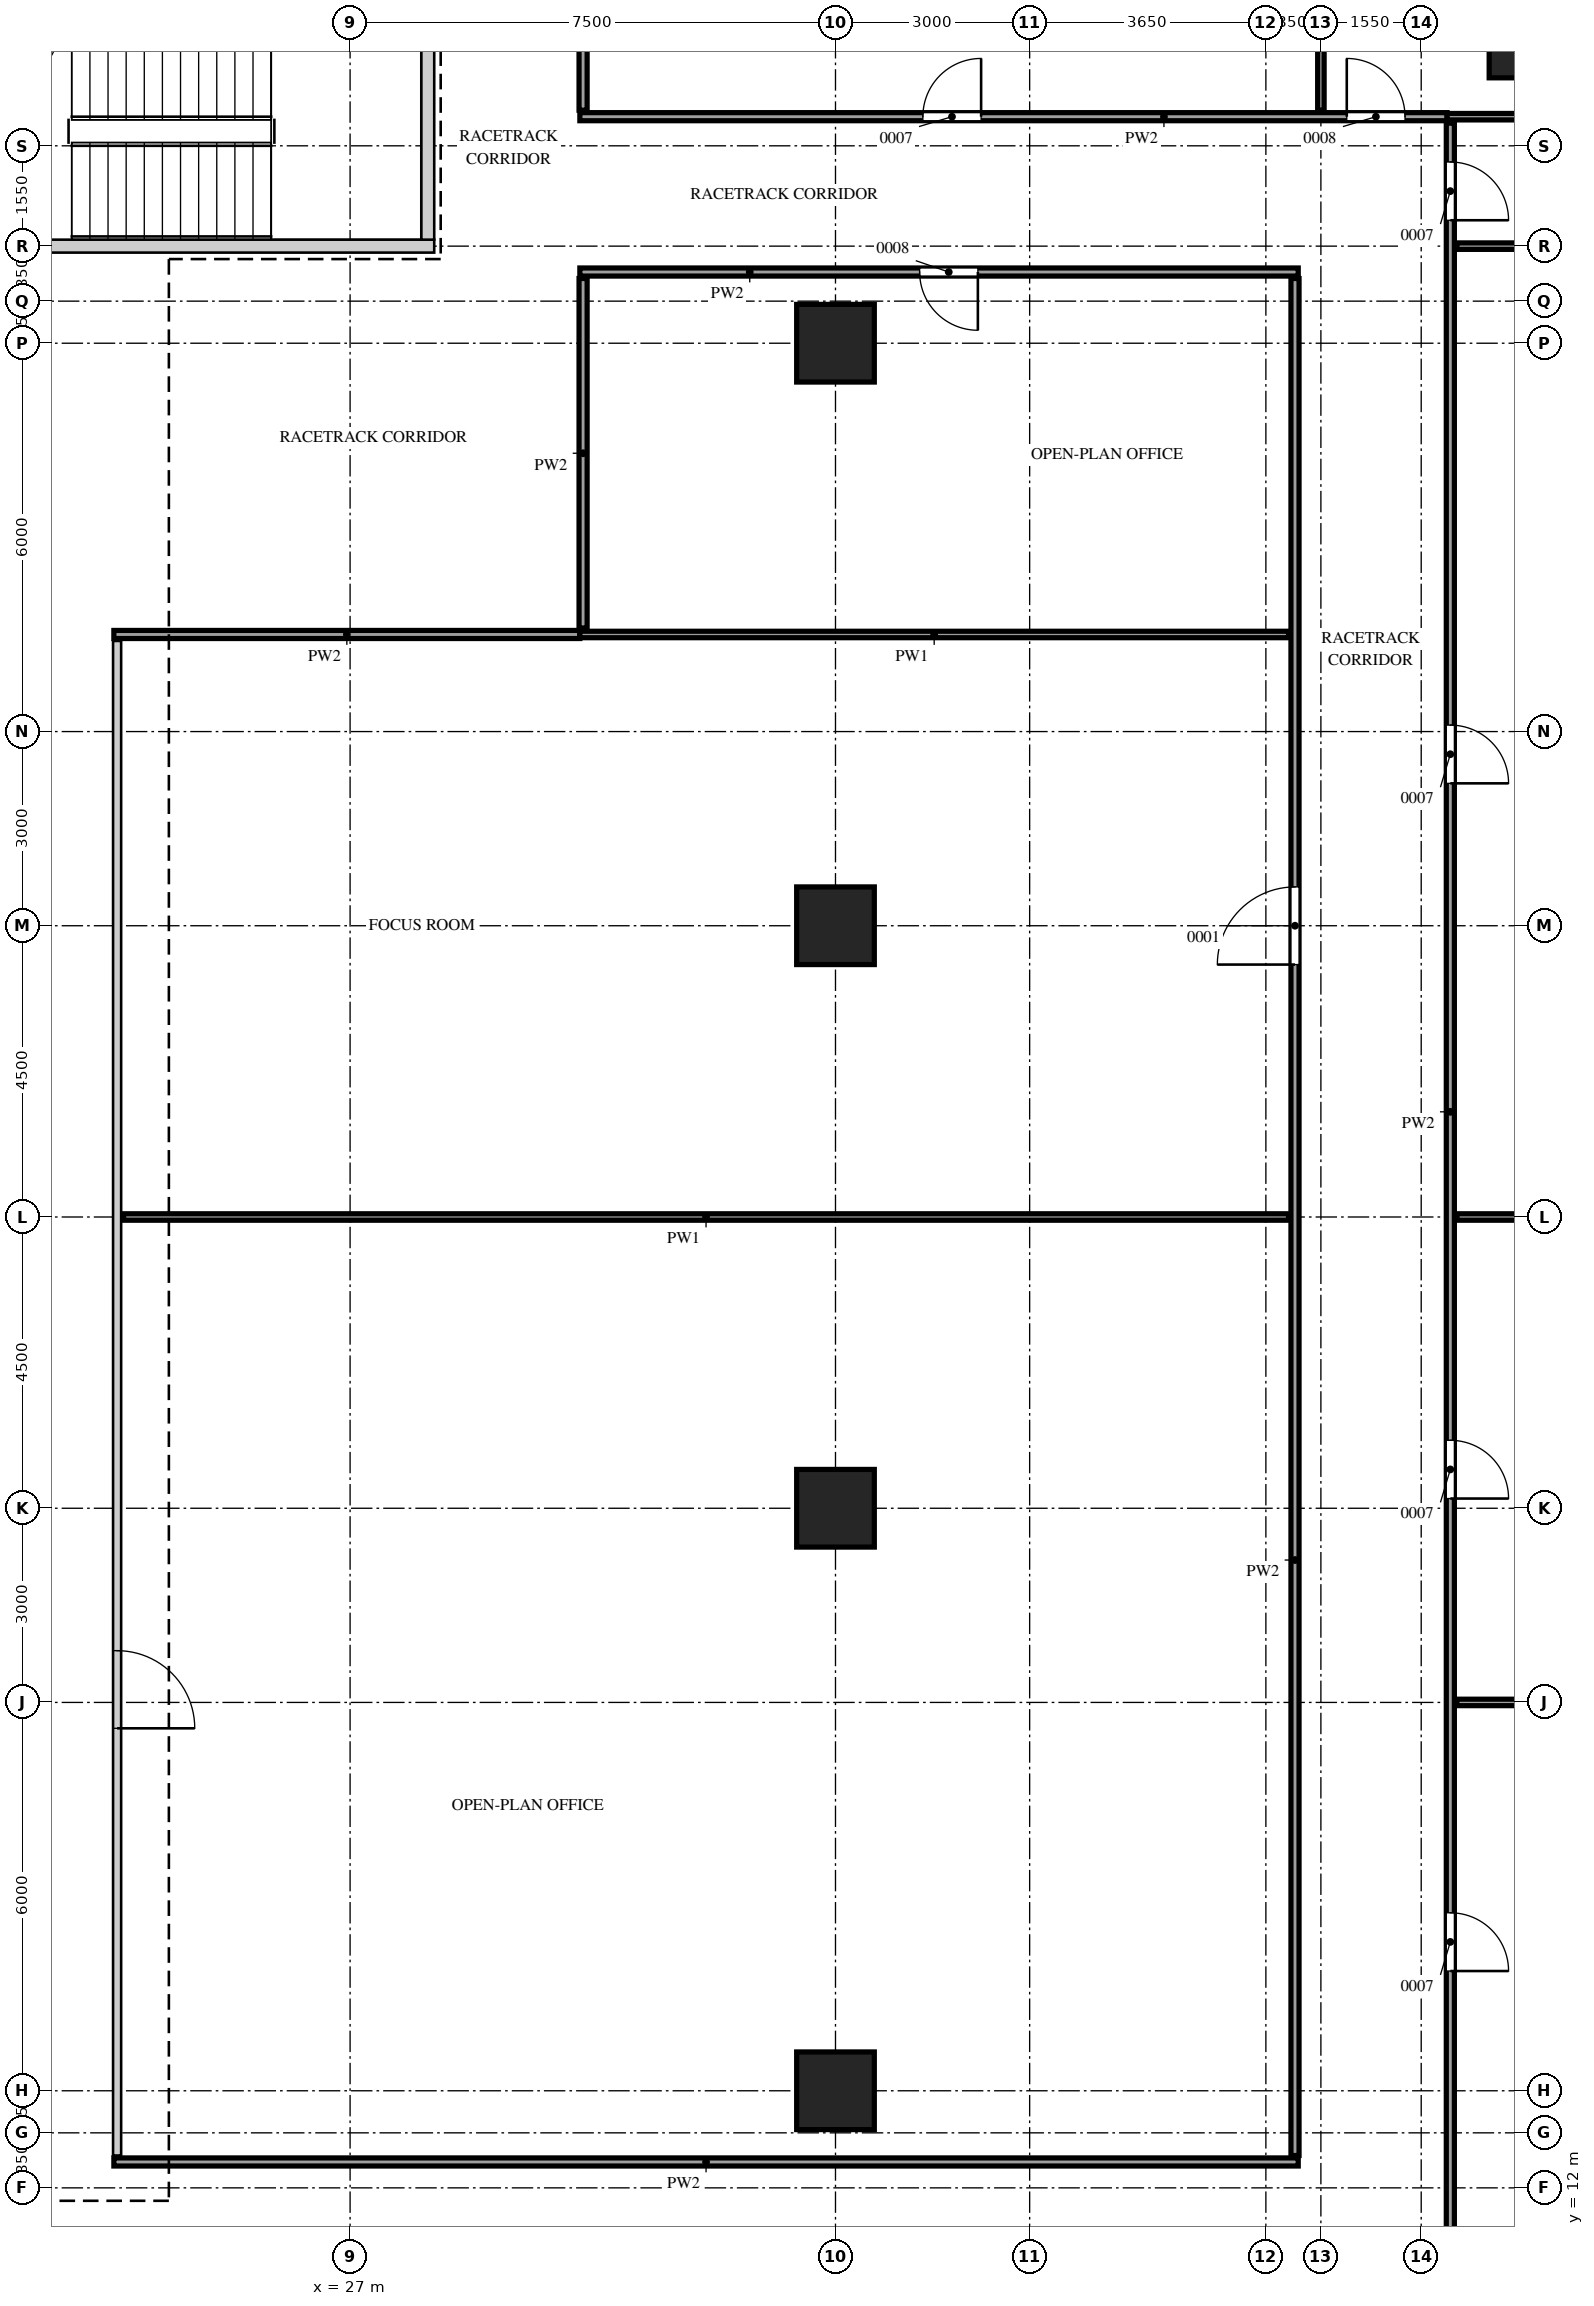
"""IFC4 building model, lengths in metres.
Left out: names, types, materials, properties, quantities, classifications, styles, units other than length and angle.
Written with IfcOpenShell. Run it as: python <this file> out.ifc"""

import sys

from ifc_helpers import new_model, si_unit, direction, frame, frame_2d, origin, origin_2d, place, context, subcontext, project, spatial, rectangle, extrude, source, transform, mapped, element, fill, save


model = new_model("IFC4")
c1 = context("Model", 3, precision=1e-05, world=origin(), true_north=direction((0.0, 1.0)))
c2 = subcontext(c1, "Body", "Model", "MODEL_VIEW")
j1 = project(units=[si_unit("LENGTHUNIT", "METRE"), si_unit("PLANEANGLEUNIT", "RADIAN")], contexts=[c1])
p1 = place(None, origin())
s1 = spatial("IfcSite", under=j1, at=p1, CompositionType="ELEMENT")
p2 = place(p1, origin())
s2 = spatial("IfcBuilding", under=s1, at=p2, CompositionType="ELEMENT")
p3 = place(p2, frame((0.0, 0.0, 192.7)))
s3 = spatial("IfcBuildingStorey", under=s2, at=p3, CompositionType="ELEMENT", Elevation=192.7)
m1 = source(origin(), c2, "Body", "SweptSolid", [
    extrude(rectangle(XDim=7.1, YDim=0.2, at=frame_2d((3.55, 0.0))), origin(), (0.0, 0.0, 1.0), 3.75),
])
p4 = place(p3, frame((21.2, 42.0, 0.0), z_axis=(0.0, 0.0, 1.0), x_axis=(1.0, 0.0, 0.0)))
e1 = element("IfcWall", 1, at=p4, inside=s3, PredefinedType="SHEAR", context=c2, shape_type="MappedRepresentation", body=[
    mapped(m1, transform((0.0, 0.0, 0.0))),
])
m2 = source(origin(), c2, "Body", "SweptSolid", [
    extrude(rectangle(XDim=3.35, YDim=0.2, at=frame_2d((1.675, 0.0))), origin(), (0.0, 0.0, 1.0), 3.75),
])
p5 = place(p3, frame((28.2, 42.1, 0.0), z_axis=(0.0, 0.0, 1.0), x_axis=(0.0, 1.0, 0.0)))
e2 = element("IfcWall", 2, at=p5, inside=s3, PredefinedType="SHEAR", context=c2, shape_type="MappedRepresentation", body=[
    mapped(m2, transform((0.0, 0.0, 0.0))),
])
m3 = source(origin(), c2, "Body", "SweptSolid", [
    extrude(rectangle(XDim=1.9, YDim=1.9, at=origin_2d()), origin(), (0.0, 0.0, 1.0), 4.0),
])
p6 = place(p3, frame((45.55, 45.55, 0.0), z_axis=(0.0, 0.0, 1.0), x_axis=(1.0, 0.0, 0.0)))
e3 = element("IfcColumn", 3, at=p6, inside=s3, PredefinedType="COLUMN", context=c2, shape_type="MappedRepresentation", body=[
    mapped(m3, transform((0.0, 0.0, 0.0))),
])
m4 = source(origin(), c2, "Body", "SweptSolid", [
    extrude(rectangle(XDim=1.2, YDim=1.2, at=origin_2d()), origin(), (0.0, 0.0, 1.0), 3.75),
])
for number, where, z_axis, x_axis in (
    (4, (34.5, 13.5, 0.0), (0.0, 0.0, 1.0), (1.0, 0.0, 0.0)),
    (5, (34.5, 22.5, 0.0), (0.0, 0.0, 1.0), (1.0, 0.0, 0.0)),
    (6, (34.5, 31.5, 0.0), (0.0, 0.0, 1.0), (1.0, 0.0, 0.0)),
    (7, (34.5, 40.5, 0.0), (0.0, 0.0, 1.0), (1.0, 0.0, 0.0)),
):
    element("IfcColumn", number, at=place(p3, frame(where, z_axis=z_axis, x_axis=x_axis)), inside=s3, PredefinedType="COLUMN", context=c2, shape_type="MappedRepresentation", body=[
        mapped(m4, transform((0.0, 0.0, 0.0))),
    ])
m5 = source(origin(), c2, "Body", "SweptSolid", [
    extrude(rectangle(XDim=33.8, YDim=0.125, at=frame_2d((16.9, 0.0))), origin(), (0.0, 0.0, 1.0), 3.8),
])
p7 = place(p3, frame((44.0, 10.1, 0.0), z_axis=(0.0, 0.0, 1.0), x_axis=(0.0, 1.0, 0.0)))
e8 = element("IfcWall", 8, at=p7, inside=s3, PredefinedType="PARTITIONING", context=c2, shape_type="MappedRepresentation", body=[
    mapped(m5, transform((0.0, 0.0, 0.0))),
])
m6 = source(origin(), c2, "Body", "SweptSolid", [
    extrude(rectangle(XDim=0.9, YDim=2.1, at=frame_2d((0.45, 1.05))), frame((0.0, 0.073, 0.0), z_axis=(0.0, -1.0, 0.0), x_axis=(1.0, 0.0, 0.0)), (0.0, 0.0, 1.0), 0.145),
])
p8 = place(p7, frame((5.25, 0.0, 0.0)))
e9 = element("IfcOpeningElement", 9, at=p8, cuts=e8, PredefinedType="OPENING", context=c2, shape_type="MappedRepresentation", body=[
    mapped(m6, transform((0.0, 0.0, 0.0))),
])
p9 = place(p7, frame((12.55, 0.0, 0.0)))
e10 = element("IfcOpeningElement", 10, at=p9, cuts=e8, PredefinedType="OPENING", context=c2, shape_type="MappedRepresentation", body=[
    mapped(m6, transform((0.0, 0.0, 0.0))),
])
p10 = place(p7, frame((23.6, 0.0, 0.0)))
e11 = element("IfcOpeningElement", 11, at=p10, cuts=e8, PredefinedType="OPENING", context=c2, shape_type="MappedRepresentation", body=[
    mapped(m6, transform((0.0, 0.0, 0.0))),
])
p11 = place(p7, frame((32.3, 0.0, 0.0)))
e12 = element("IfcOpeningElement", 12, at=p11, cuts=e8, PredefinedType="OPENING", context=c2, shape_type="MappedRepresentation", body=[
    mapped(m6, transform((0.0, 0.0, 0.0))),
])
m7 = source(origin(), c2, "Body", "SweptSolid", [
    extrude(rectangle(XDim=18.3, YDim=0.125, at=frame_2d((9.15, 0.0))), origin(), (0.0, 0.0, 1.0), 3.8),
])
p12 = place(p3, frame((23.35, 12.4, 0.0), z_axis=(0.0, 0.0, 1.0), x_axis=(1.0, 0.0, 0.0)))
e13 = element("IfcWall", 13, at=p12, inside=s3, PredefinedType="PARTITIONING", context=c2, shape_type="MappedRepresentation", body=[
    mapped(m7, transform((0.0, 0.0, 0.0))),
])
m8 = source(origin(), c2, "Body", "SweptSolid", [
    extrude(rectangle(XDim=23.4, YDim=0.125, at=frame_2d((11.7, 0.0))), origin(), (0.0, 0.0, 1.0), 3.8),
])
p13 = place(p3, frame((23.4, 12.5, 0.0), z_axis=(0.0, 0.0, 1.0), x_axis=(0.0, 1.0, 0.0)))
e14 = element("IfcWall", 14, at=p13, inside=s3, PredefinedType="PARTITIONING", context=c2, shape_type="MappedRepresentation", body=[
    mapped(m8, transform((0.0, 0.0, 0.0))),
])
m9 = source(origin(), c2, "Body", "SweptSolid", [
    extrude(rectangle(XDim=1.2, YDim=2.1, at=frame_2d((0.6, 1.05))), frame((0.0, 0.073, 0.0), z_axis=(0.0, -1.0, 0.0), x_axis=(1.0, 0.0, 0.0)), (0.0, 0.0, 1.0), 0.145),
])
p14 = place(p13, frame((6.6, 0.0, 0.0)))
e15 = element("IfcOpeningElement", 15, at=p14, cuts=e14, PredefinedType="OPENING", context=c2, shape_type="MappedRepresentation", body=[
    mapped(m9, transform((0.0, 0.0, 0.0))),
])
m10 = source(origin(), c2, "Body", "SweptSolid", [
    extrude(rectangle(XDim=29.0, YDim=0.125, at=frame_2d((14.5, 0.0))), origin(), (0.0, 0.0, 1.0), 3.8),
])
p15 = place(p3, frame((41.6, 12.5, 0.0), z_axis=(0.0, 0.0, 1.0), x_axis=(0.0, 1.0, 0.0)))
e16 = element("IfcWall", 16, at=p15, inside=s3, PredefinedType="PARTITIONING", context=c2, shape_type="MappedRepresentation", body=[
    mapped(m10, transform((0.0, 0.0, 0.0))),
])
p16 = place(p15, frame((18.4, 0.0, 0.0)))
e17 = element("IfcOpeningElement", 17, at=p16, cuts=e16, PredefinedType="OPENING", context=c2, shape_type="MappedRepresentation", body=[
    mapped(m9, transform((0.0, 0.0, 0.0))),
])
m11 = source(origin(), c2, "Body", "SweptSolid", [
    extrude(rectangle(XDim=6.75, YDim=0.1, at=frame_2d((3.375, 0.0))), origin(), (0.0, 0.0, 1.0), 3.8),
])
p17 = place(p3, frame((44.1, 19.5, 0.0), z_axis=(0.0, 0.0, 1.0), x_axis=(1.0, 0.0, 0.0)))
e18 = element("IfcWall", 18, at=p17, inside=s3, PredefinedType="PARTITIONING", context=c2, shape_type="MappedRepresentation", body=[
    mapped(m11, transform((0.0, 0.0, 0.0))),
])
m12 = source(origin(), c2, "Body", "SweptSolid", [
    extrude(rectangle(XDim=18.0, YDim=0.1, at=frame_2d((9.0, 0.0))), origin(), (0.0, 0.0, 1.0), 3.8),
])
p18 = place(p3, frame((23.5, 27.0, 0.0), z_axis=(0.0, 0.0, 1.0), x_axis=(1.0, 0.0, 0.0)))
e19 = element("IfcWall", 19, at=p18, inside=s3, PredefinedType="PARTITIONING", context=c2, shape_type="MappedRepresentation", body=[
    mapped(m12, transform((0.0, 0.0, 0.0))),
])
p19 = place(p3, frame((44.1, 27.0, 0.0), z_axis=(0.0, 0.0, 1.0), x_axis=(1.0, 0.0, 0.0)))
e20 = element("IfcWall", 20, at=p19, inside=s3, PredefinedType="PARTITIONING", context=c2, shape_type="MappedRepresentation", body=[
    mapped(m11, transform((0.0, 0.0, 0.0))),
])
m13 = source(origin(), c2, "Body", "SweptSolid", [
    extrude(rectangle(XDim=7.2, YDim=0.125, at=frame_2d((3.6, 0.0))), origin(), (0.0, 0.0, 1.0), 3.8),
])
p20 = place(p3, frame((23.35, 36.0, 0.0), z_axis=(0.0, 0.0, 1.0), x_axis=(1.0, 0.0, 0.0)))
e21 = element("IfcWall", 21, at=p20, inside=s3, PredefinedType="PARTITIONING", context=c2, shape_type="MappedRepresentation", body=[
    mapped(m13, transform((0.0, 0.0, 0.0))),
])
m14 = source(origin(), c2, "Body", "SweptSolid", [
    extrude(rectangle(XDim=10.95, YDim=0.1, at=frame_2d((5.475, 0.0))), origin(), (0.0, 0.0, 1.0), 3.8),
])
p21 = place(p3, frame((30.55, 36.0, 0.0), z_axis=(0.0, 0.0, 1.0), x_axis=(1.0, 0.0, 0.0)))
e22 = element("IfcWall", 22, at=p21, inside=s3, PredefinedType="PARTITIONING", context=c2, shape_type="MappedRepresentation", body=[
    mapped(m14, transform((0.0, 0.0, 0.0))),
])
m15 = source(origin(), c2, "Body", "SweptSolid", [
    extrude(rectangle(XDim=5.4, YDim=0.125, at=frame_2d((2.7, 0.0))), origin(), (0.0, 0.0, 1.0), 3.8),
])
p22 = place(p3, frame((30.6, 36.1, 0.0), z_axis=(0.0, 0.0, 1.0), x_axis=(0.0, 1.0, 0.0)))
e23 = element("IfcWall", 23, at=p22, inside=s3, PredefinedType="PARTITIONING", context=c2, shape_type="MappedRepresentation", body=[
    mapped(m15, transform((0.0, 0.0, 0.0))),
])
m16 = source(origin(), c2, "Body", "SweptSolid", [
    extrude(rectangle(XDim=11.1, YDim=0.125, at=frame_2d((5.55, 0.0))), origin(), (0.0, 0.0, 1.0), 3.8),
])
p23 = place(p3, frame((30.55, 41.6, 0.0), z_axis=(0.0, 0.0, 1.0), x_axis=(1.0, 0.0, 0.0)))
e24 = element("IfcWall", 24, at=p23, inside=s3, PredefinedType="PARTITIONING", context=c2, shape_type="MappedRepresentation", body=[
    mapped(m16, transform((0.0, 0.0, 0.0))),
])
p24 = place(p23, frame((5.25, 0.0, 0.0)))
e25 = element("IfcOpeningElement", 25, at=p24, cuts=e24, PredefinedType="OPENING", context=c2, shape_type="MappedRepresentation", body=[
    mapped(m6, transform((0.0, 0.0, 0.0))),
])
p25 = place(p3, frame((44.1, 42.0, 0.0), z_axis=(0.0, 0.0, 1.0), x_axis=(1.0, 0.0, 0.0)))
e26 = element("IfcWall", 26, at=p25, inside=s3, PredefinedType="PARTITIONING", context=c2, shape_type="MappedRepresentation", body=[
    mapped(m11, transform((0.0, 0.0, 0.0))),
])
m17 = source(origin(), c2, "Body", "SweptSolid", [
    extrude(rectangle(XDim=13.4, YDim=0.125, at=frame_2d((6.7, 0.0))), origin(), (0.0, 0.0, 1.0), 3.8),
])
p26 = place(p3, frame((30.55, 44.0, 0.0), z_axis=(0.0, 0.0, 1.0), x_axis=(1.0, 0.0, 0.0)))
e27 = element("IfcWall", 27, at=p26, inside=s3, PredefinedType="PARTITIONING", context=c2, shape_type="MappedRepresentation", body=[
    mapped(m17, transform((0.0, 0.0, 0.0))),
])
p27 = place(p26, frame((5.3, 0.0, 0.0)))
e28 = element("IfcOpeningElement", 28, at=p27, cuts=e27, PredefinedType="OPENING", context=c2, shape_type="MappedRepresentation", body=[
    mapped(m6, transform((0.0, 0.0, 0.0))),
])
p28 = place(p26, frame((11.85, 0.0, 0.0)))
e29 = element("IfcOpeningElement", 29, at=p28, cuts=e27, PredefinedType="OPENING", context=c2, shape_type="MappedRepresentation", body=[
    mapped(m6, transform((0.0, 0.0, 0.0))),
])
m18 = source(origin(), c2, "Body", "SweptSolid", [
    extrude(rectangle(XDim=6.9, YDim=0.1, at=frame_2d((3.45, 0.0))), origin(), (0.0, 0.0, 1.0), 3.8),
])
p29 = place(p3, frame((43.95, 44.0, 0.0), z_axis=(0.0, 0.0, 1.0), x_axis=(1.0, 0.0, 0.0)))
e30 = element("IfcWall", 30, at=p29, inside=s3, PredefinedType="PARTITIONING", context=c2, shape_type="MappedRepresentation", body=[
    mapped(m18, transform((0.0, 0.0, 0.0))),
])
m19 = source(origin(), c2, "Body", "SweptSolid", [
    extrude(rectangle(XDim=3.85, YDim=0.125, at=frame_2d((1.925, 0.0))), origin(), (0.0, 0.0, 1.0), 3.8),
])
p30 = place(p3, frame((30.6, 44.1, 0.0), z_axis=(0.0, 0.0, 1.0), x_axis=(0.0, 1.0, 0.0)))
e31 = element("IfcWall", 31, at=p30, inside=s3, PredefinedType="PARTITIONING", context=c2, shape_type="MappedRepresentation", body=[
    mapped(m19, transform((0.0, 0.0, 0.0))),
])
m20 = source(origin(), c2, "Body", "SweptSolid", [
    extrude(rectangle(XDim=6.75, YDim=0.1, at=frame_2d((3.375, 0.0))), origin(), (0.0, 0.0, 1.0), 3.3),
])
p31 = place(p3, frame((42.0, 44.1, 0.0), z_axis=(0.0, 0.0, 1.0), x_axis=(0.0, 1.0, 0.0)))
e32 = element("IfcWall", 32, at=p31, inside=s3, PredefinedType="PARTITIONING", context=c2, shape_type="MappedRepresentation", body=[
    mapped(m20, transform((0.0, 0.0, 0.0))),
])
m21 = source(origin(), c2, "Body", "SweptSolid", [
    extrude(rectangle(XDim=0.9, YDim=2.1, at=frame_2d((0.45, 1.05))), frame((0.0, 0.025, 0.0), z_axis=(0.0, -1.0, 0.0), x_axis=(1.0, 0.0, 0.0)), (0.0, 0.0, 1.0), 0.05),
])
p32 = place(p8, origin())
e33 = element("IfcDoor", 33, at=p32, inside=s3, OperationType="SINGLE_SWING_LEFT", PredefinedType="DOOR", context=c2, shape_type="MappedRepresentation", body=[
    mapped(m21, transform((0.0, 0.0, 0.0))),
])
fill(e9, e33)
p33 = place(p9, origin())
e34 = element("IfcDoor", 34, at=p33, inside=s3, OperationType="SINGLE_SWING_LEFT", PredefinedType="DOOR", context=c2, shape_type="MappedRepresentation", body=[
    mapped(m21, transform((0.0, 0.0, 0.0))),
])
fill(e10, e34)
p34 = place(p10, origin())
e35 = element("IfcDoor", 35, at=p34, inside=s3, OperationType="SINGLE_SWING_LEFT", PredefinedType="DOOR", context=c2, shape_type="MappedRepresentation", body=[
    mapped(m21, transform((0.0, 0.0, 0.0))),
])
fill(e11, e35)
p35 = place(p11, origin())
e36 = element("IfcDoor", 36, at=p35, inside=s3, OperationType="SINGLE_SWING_LEFT", PredefinedType="DOOR", context=c2, shape_type="MappedRepresentation", body=[
    mapped(m21, transform((0.0, 0.0, 0.0))),
])
fill(e12, e36)
p36 = place(p27, origin())
e37 = element("IfcDoor", 37, at=p36, inside=s3, OperationType="SINGLE_SWING_LEFT", PredefinedType="DOOR", context=c2, shape_type="MappedRepresentation", body=[
    mapped(m21, transform((0.0, 0.0, 0.0))),
])
fill(e28, e37)
p37 = place(p28, origin())
e38 = element("IfcDoor", 38, at=p37, inside=s3, OperationType="SINGLE_SWING_RIGHT", PredefinedType="DOOR", context=c2, shape_type="MappedRepresentation", body=[
    mapped(m21, transform((0.0, 0.0, 0.0))),
])
fill(e29, e38)
m22 = source(origin(), c2, "Body", "SweptSolid", [
    extrude(rectangle(XDim=1.2, YDim=2.1, at=frame_2d((0.6, 1.05))), frame((0.0, 0.025, 0.0), z_axis=(0.0, -1.0, 0.0), x_axis=(1.0, 0.0, 0.0)), (0.0, 0.0, 1.0), 0.05),
])
p38 = place(p14, origin())
e39 = element("IfcDoor", 39, at=p38, inside=s3, OperationType="SINGLE_SWING_LEFT", PredefinedType="DOOR", context=c2, shape_type="MappedRepresentation", body=[
    mapped(m22, transform((0.0, 0.0, 0.0))),
])
fill(e15, e39)
p39 = place(p16, origin())
e40 = element("IfcDoor", 40, at=p39, inside=s3, OperationType="SINGLE_SWING_RIGHT", PredefinedType="DOOR", context=c2, shape_type="MappedRepresentation", body=[
    mapped(m22, transform((0.0, 0.0, 0.0))),
])
fill(e17, e40)
p40 = place(p24, origin())
e41 = element("IfcDoor", 41, at=p40, inside=s3, OperationType="SINGLE_SWING_RIGHT", PredefinedType="DOOR", context=c2, shape_type="MappedRepresentation", body=[
    mapped(m21, transform((0.0, 0.0, 0.0))),
])
fill(e25, e41)
save(model, sys.argv[1])
